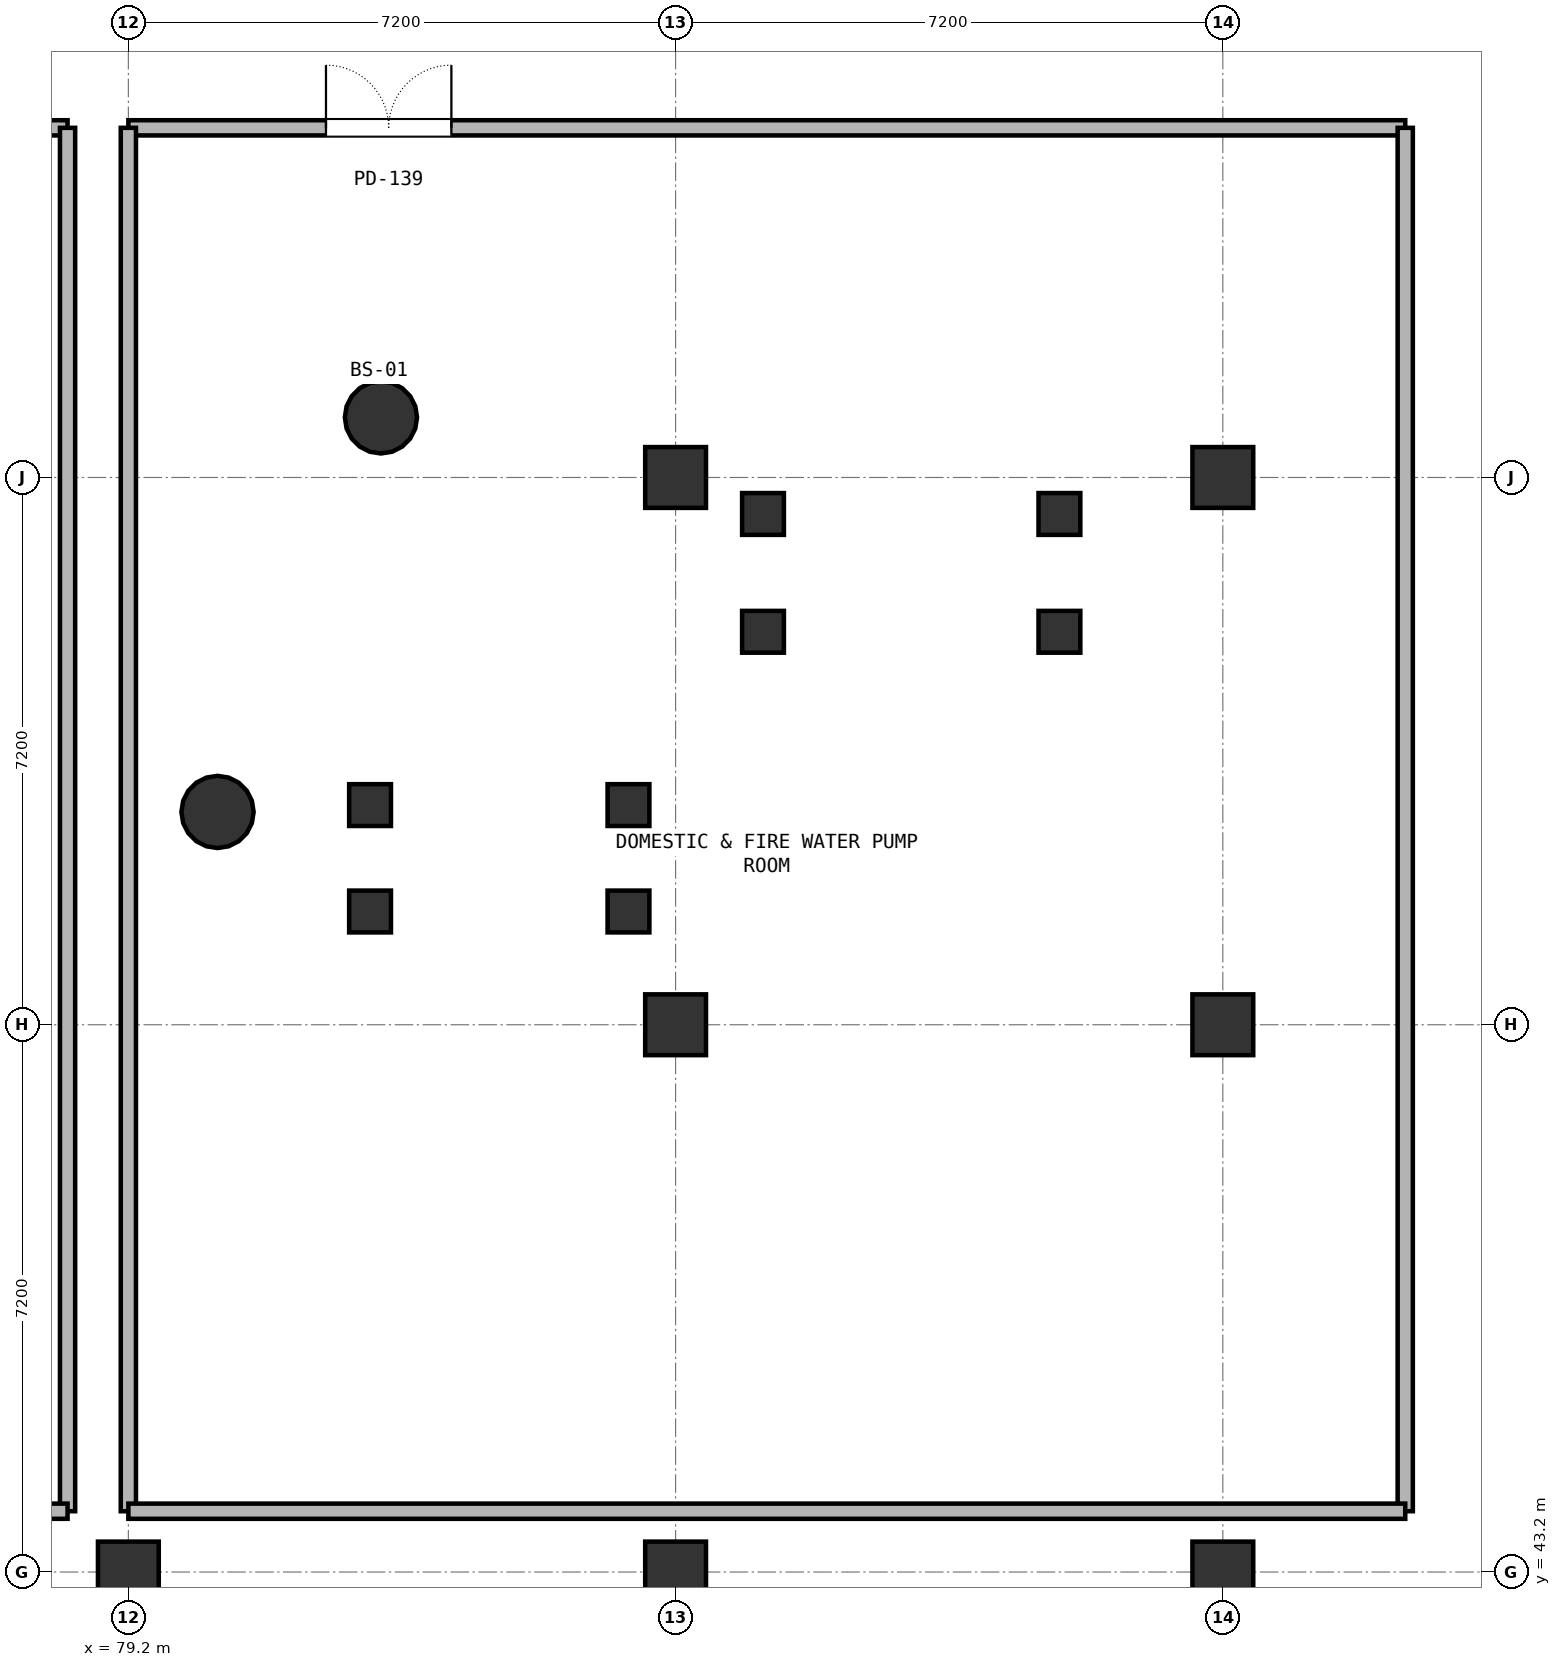
"""IFC4 building model, lengths in metres.
Left out: names, types, materials, properties, quantities, classifications, styles, units other than length and angle.
Written with IfcOpenShell. Run it as: python <this file> out.ifc"""

import sys

from ifc_helpers import new_model, si_unit, direction, frame, frame_2d, origin, origin_2d, place, context, subcontext, project, spatial, rectangle, circle, extrude, element, fill, save


model = new_model("IFC4")
c1 = context("Model", 3, precision=1e-05, world=origin(), true_north=direction((0.0, 1.0)))
c2 = subcontext(c1, "Body", "Model", "MODEL_VIEW")
j1 = project(units=[si_unit("LENGTHUNIT", "METRE"), si_unit("PLANEANGLEUNIT", "RADIAN")], contexts=[c1])
p1 = place(None, origin())
s1 = spatial("IfcSite", under=j1, at=p1, CompositionType="ELEMENT")
p2 = place(p1, origin())
s2 = spatial("IfcBuilding", under=s1, at=p2, CompositionType="ELEMENT")
p3 = place(p2, frame((0.0, 0.0, -4.8)))
s3 = spatial("IfcBuildingStorey", under=s2, at=p3, CompositionType="ELEMENT", Elevation=-4.8)
for number, where, z_axis, x_axis in (
    (1, (80.373, 53.2, 0.0), (0.0, 0.0, 1.0), (1.0, 0.0, 0.0)),
    (2, (82.523, 58.391, 0.0), (0.0, 0.0, 1.0), (1.0, 0.0, 0.0)),
):
    element("IfcColumn", number, at=place(p3, frame(where, z_axis=z_axis, x_axis=x_axis)), inside=s3, PredefinedType="COLUMN", context=c2, shape_type="SweptSolid", body=[
        extrude(circle(Radius=0.475, at=origin_2d()), origin(), (0.0, 0.0, 1.0), 4.8),
    ])
for number, where, z_axis, x_axis in (
    (3, (79.2, 43.2, 0.0), (0.0, 0.0, 1.0), (1.0, 0.0, 0.0)),
    (4, (86.4, 43.2, 0.0), (0.0, 0.0, 1.0), (1.0, 0.0, 0.0)),
    (5, (86.4, 50.4, 0.0), (0.0, 0.0, 1.0), (1.0, 0.0, 0.0)),
    (6, (86.4, 57.6, 0.0), (0.0, 0.0, 1.0), (1.0, 0.0, 0.0)),
    (7, (93.6, 43.2, 0.0), (0.0, 0.0, 1.0), (1.0, 0.0, 0.0)),
    (8, (93.6, 50.4, 0.0), (0.0, 0.0, 1.0), (1.0, 0.0, 0.0)),
    (9, (93.6, 57.6, 0.0), (0.0, 0.0, 1.0), (1.0, 0.0, 0.0)),
):
    element("IfcColumn", number, at=place(p3, frame(where, z_axis=z_axis, x_axis=x_axis)), inside=s3, PredefinedType="COLUMN", context=c2, shape_type="SweptSolid", body=[
        extrude(rectangle(XDim=0.8, YDim=0.8, at=origin_2d()), origin(), (0.0, 0.0, 1.0), 4.8),
    ])
for number, where, z_axis, x_axis in (
    (10, (87.55, 55.57, 0.0), (0.0, 0.0, 1.0), (1.0, 0.0, 0.0)),
    (11, (91.45, 55.57, 0.0), (0.0, 0.0, 1.0), (1.0, 0.0, 0.0)),
    (12, (87.55, 57.12, 0.0), (0.0, 0.0, 1.0), (1.0, 0.0, 0.0)),
    (13, (91.45, 57.12, 0.0), (0.0, 0.0, 1.0), (1.0, 0.0, 0.0)),
    (14, (82.38, 51.89, 0.0), (0.0, 0.0, 1.0), (1.0, 0.0, 0.0)),
    (15, (85.78, 51.89, 0.0), (0.0, 0.0, 1.0), (1.0, 0.0, 0.0)),
    (16, (82.38, 53.29, 0.0), (0.0, 0.0, 1.0), (1.0, 0.0, 0.0)),
    (17, (85.78, 53.29, 0.0), (0.0, 0.0, 1.0), (1.0, 0.0, 0.0)),
):
    element("IfcColumn", number, at=place(p3, frame(where, z_axis=z_axis, x_axis=x_axis)), inside=s3, PredefinedType="COLUMN", context=c2, shape_type="SweptSolid", body=[
        extrude(rectangle(XDim=0.55, YDim=0.55, at=origin_2d()), origin(), (0.0, 0.0, 1.0), 4.55),
    ])
p4 = place(p3, frame((57.6, 62.2, 0.0), z_axis=(0.0, 0.0, 1.0), x_axis=(1.0, 0.0, 0.0)))
e18 = element("IfcWall", 18, at=p4, inside=s3, PredefinedType="PARTITIONING", context=c2, shape_type="SweptSolid", body=[
    extrude(rectangle(XDim=20.8, YDim=0.2, at=frame_2d((10.4, 0.0))), origin(), (0.0, 0.0, 1.0), 3.52),
])
p5 = place(p4, frame((2.6, 0.0, 0.0)))
e19 = element("IfcOpeningElement", 19, at=p5, cuts=e18, PredefinedType="OPENING", context=c2, shape_type="SweptSolid", body=[
    extrude(rectangle(XDim=1.65, YDim=2.25, at=frame_2d((0.825, 1.125))), frame((0.0, 0.11, 0.0), z_axis=(0.0, -1.0, 0.0), x_axis=(1.0, 0.0, 0.0)), (0.0, 0.0, 1.0), 0.22),
])
p6 = place(p3, frame((78.4, 44.0, 0.0), z_axis=(0.0, 0.0, 1.0), x_axis=(0.0, 1.0, 0.0)))
e20 = element("IfcWall", 20, at=p6, inside=s3, PredefinedType="PARTITIONING", context=c2, shape_type="SweptSolid", body=[
    extrude(rectangle(XDim=18.2, YDim=0.2, at=frame_2d((9.1, 0.0))), origin(), (0.0, 0.0, 1.0), 3.52),
])
p7 = place(p3, frame((78.4, 44.0, 0.0), z_axis=(0.0, 0.0, 1.0), x_axis=(-1.0, 0.0, 0.0)))
e21 = element("IfcWall", 21, at=p7, inside=s3, PredefinedType="PARTITIONING", context=c2, shape_type="SweptSolid", body=[
    extrude(rectangle(XDim=20.8, YDim=0.2, at=frame_2d((10.4, 0.0))), origin(), (0.0, 0.0, 1.0), 3.52),
])
p8 = place(p3, frame((79.2, 62.2, 0.0), z_axis=(0.0, 0.0, 1.0), x_axis=(1.0, 0.0, 0.0)))
e22 = element("IfcWall", 22, at=p8, inside=s3, PredefinedType="PARTITIONING", context=c2, shape_type="SweptSolid", body=[
    extrude(rectangle(XDim=16.8, YDim=0.2, at=frame_2d((8.4, 0.0))), origin(), (0.0, 0.0, 1.0), 3.52),
])
p9 = place(p8, frame((2.6, 0.0, 0.0)))
e23 = element("IfcOpeningElement", 23, at=p9, cuts=e22, PredefinedType="OPENING", context=c2, shape_type="SweptSolid", body=[
    extrude(rectangle(XDim=1.65, YDim=2.25, at=frame_2d((0.825, 1.125))), frame((0.0, 0.11, 0.0), z_axis=(0.0, -1.0, 0.0), x_axis=(1.0, 0.0, 0.0)), (0.0, 0.0, 1.0), 0.22),
])
for number, where, z_axis, x_axis in (
    (24, (96.0, 44.0, 0.0), (0.0, 0.0, 1.0), (0.0, 1.0, 0.0)),
    (25, (79.2, 62.2, 0.0), (0.0, 0.0, 1.0), (0.0, -1.0, 0.0)),
):
    element("IfcWall", number, at=place(p3, frame(where, z_axis=z_axis, x_axis=x_axis)), inside=s3, PredefinedType="PARTITIONING", context=c2, shape_type="SweptSolid", body=[
        extrude(rectangle(XDim=18.2, YDim=0.2, at=frame_2d((9.1, 0.0))), origin(), (0.0, 0.0, 1.0), 3.52),
    ])
p10 = place(p3, frame((96.0, 44.0, 0.0), z_axis=(0.0, 0.0, 1.0), x_axis=(-1.0, 0.0, 0.0)))
e26 = element("IfcWall", 26, at=p10, inside=s3, PredefinedType="PARTITIONING", context=c2, shape_type="SweptSolid", body=[
    extrude(rectangle(XDim=16.8, YDim=0.2, at=frame_2d((8.4, 0.0))), origin(), (0.0, 0.0, 1.0), 3.52),
])
p11 = place(p9, origin())
e27 = element("IfcDoor", 27, at=p11, inside=s3, OperationType="DOUBLE_DOOR_SINGLE_SWING", PredefinedType="DOOR", context=c2, shape_type="SweptSolid", body=[
    extrude(rectangle(XDim=1.65, YDim=2.25, at=frame_2d((0.825, 1.125))), frame((0.0, 0.025, 0.0), z_axis=(0.0, -1.0, 0.0), x_axis=(1.0, 0.0, 0.0)), (0.0, 0.0, 1.0), 0.05),
])
fill(e23, e27)
save(model, sys.argv[1])
